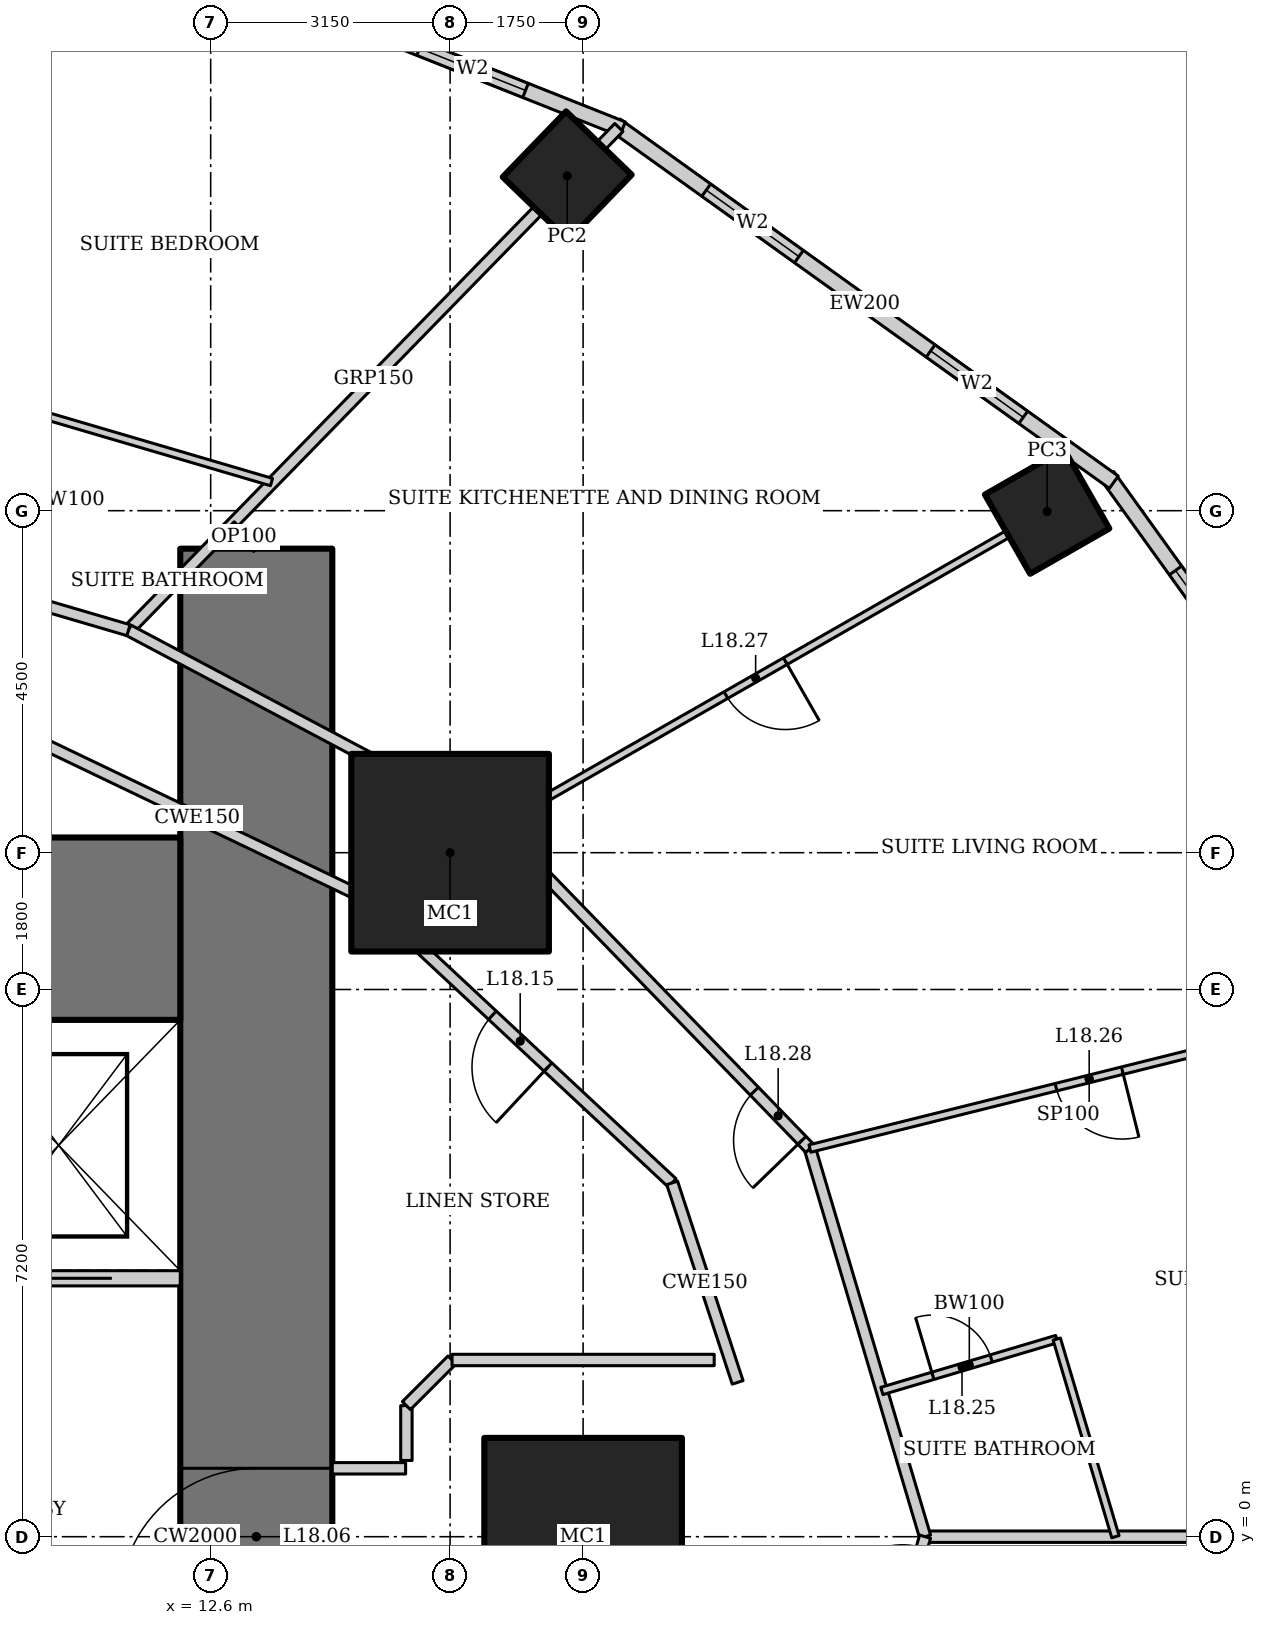
"""IFC4 building model, lengths in metres.
Left out: names, types, materials, properties, quantities, classifications, styles, units other than length and angle.
Written with IfcOpenShell. Run it as: python <this file> out.ifc"""

import sys

from ifc_helpers import new_model, si_unit, direction, frame, frame_2d, origin, origin_2d, place, context, subcontext, project, spatial, rectangle, hollow_rectangle, extrude, element, fill, save


model = new_model("IFC4")
c1 = context("Model", 3, precision=1e-05, world=origin(), true_north=direction((0.0, 1.0)))
c2 = subcontext(c1, "Body", "Model", "MODEL_VIEW")
j1 = project(units=[si_unit("LENGTHUNIT", "METRE"), si_unit("PLANEANGLEUNIT", "RADIAN")], contexts=[c1])
p1 = place(None, origin())
s1 = spatial("IfcSite", under=j1, at=p1, CompositionType="ELEMENT")
p2 = place(p1, origin())
s2 = spatial("IfcBuilding", under=s1, at=p2, CompositionType="ELEMENT")
p3 = place(p2, frame((0.0, 0.0, 80.2)))
s3 = spatial("IfcBuildingStorey", under=s2, at=p3, CompositionType="ELEMENT", Elevation=80.2)
for number, where, z_axis, x_axis in (
    (1, (17.5, 0.0, 0.0), (0.0, 0.0, 1.0), (1.0, 0.0, 0.0)),
    (2, (15.75, 9.0, 0.0), (0.0, 0.0, 1.0), (1.0, 0.0, 0.0)),
):
    element("IfcColumn", number, at=place(p3, frame(where, z_axis=z_axis, x_axis=x_axis)), inside=s3, PredefinedType="COLUMN", context=c2, shape_type="SweptSolid", body=[
        extrude(hollow_rectangle(XDim=2.6, YDim=2.6, WallThickness=0.13, at=origin_2d()), origin(), (0.0, 0.0, 1.0), 3.6),
    ])
p4 = place(p3, frame((23.605, 13.489, 0.0), z_axis=(0.0, 0.0, 1.0), x_axis=(0.86824298017, 0.496139221777, 0.0)))
e3 = element("IfcColumn", 3, at=p4, inside=s3, PredefinedType="COLUMN", context=c2, shape_type="SweptSolid", body=[
    extrude(hollow_rectangle(XDim=1.2, YDim=1.2, WallThickness=0.12, at=origin_2d()), origin(), (0.0, 0.0, 1.0), 3.6),
])
p5 = place(p3, frame((17.291, 17.905, 0.0), z_axis=(0.0, 0.0, 1.0), x_axis=(0.694658370459, 0.719339800339, 0.0)))
e4 = element("IfcColumn", 4, at=p5, inside=s3, PredefinedType="COLUMN", context=c2, shape_type="SweptSolid", body=[
    extrude(hollow_rectangle(XDim=1.2, YDim=1.2, WallThickness=0.1, at=origin_2d()), origin(), (0.0, 0.0, 1.0), 3.6),
])
p6 = place(p3, frame((13.2, -13.0, 0.0), z_axis=(0.0, 0.0, 1.0), x_axis=(0.0, 1.0, 0.0)))
e5 = element("IfcWall", 5, at=p6, inside=s3, PredefinedType="SHEAR", context=c2, shape_type="SweptSolid", body=[
    extrude(rectangle(XDim=26.0, YDim=2.0, at=frame_2d((13.0, 0.0))), origin(), (0.0, 0.0, 1.0), 3.6),
])
p7 = place(p6, frame((12.1, 0.0, 0.0)))
e6 = element("IfcOpeningElement", 6, at=p7, cuts=e5, PredefinedType="OPENING", context=c2, shape_type="SweptSolid", body=[
    extrude(rectangle(XDim=1.8, YDim=2.1, at=frame_2d((0.9, 1.05))), frame((0.0, 1.01, 0.0), z_axis=(0.0, -1.0, 0.0), x_axis=(1.0, 0.0, 0.0)), (0.0, 0.0, 1.0), 2.02),
])
p8 = place(p3, frame((12.2, 8.0, 0.0), z_axis=(0.0, 0.0, 1.0), x_axis=(-1.0, 0.0, 0.0)))
e7 = element("IfcWall", 7, at=p8, inside=s3, PredefinedType="SHEAR", context=c2, shape_type="SweptSolid", body=[
    extrude(rectangle(XDim=24.4, YDim=2.4, at=frame_2d((12.2, 0.0))), origin(), (0.0, 0.0, 1.0), 3.6),
])
p9 = place(p3, frame((12.2, 3.4, 0.0), z_axis=(0.0, 0.0, 1.0), x_axis=(-1.0, 0.0, 0.0)))
e8 = element("IfcWall", 8, at=p9, inside=s3, PredefinedType="SOLIDWALL", context=c2, shape_type="SweptSolid", body=[
    extrude(rectangle(XDim=6.6, YDim=0.2, at=frame_2d((3.3, 0.0))), origin(), (0.0, 0.0, 1.0), 3.6),
])
p10 = place(p9, frame((4.45, 0.0, 0.0)))
e9 = element("IfcOpeningElement", 9, at=p10, cuts=e8, PredefinedType="OPENING", context=c2, shape_type="SweptSolid", body=[
    extrude(rectangle(XDim=1.1, YDim=2.2, at=frame_2d((0.55, 1.1))), frame((0.0, 0.11, 0.0), z_axis=(0.0, -1.0, 0.0), x_axis=(1.0, 0.0, 0.0)), (0.0, 0.0, 1.0), 0.22),
])
p11 = place(p9, frame((0.9, 0.0, 0.0)))
e10 = element("IfcOpeningElement", 10, at=p11, cuts=e8, PredefinedType="OPENING", context=c2, shape_type="SweptSolid", body=[
    extrude(rectangle(XDim=1.4, YDim=2.2, at=frame_2d((0.7, 1.1))), frame((0.0, 0.11, 0.0), z_axis=(0.0, -1.0, 0.0), x_axis=(1.0, 0.0, 0.0)), (0.0, 0.0, 1.0), 0.22),
])
p12 = place(p3, frame((29.26, 7.2, 0.0), z_axis=(0.0, 0.0, 1.0), x_axis=(-0.583937613703, 0.811798536155, 0.0)))
e11 = element("IfcWall", 11, at=p12, inside=s3, PredefinedType="SOLIDWALL", context=c2, shape_type="SweptSolid", body=[
    extrude(rectangle(XDim=8.323, YDim=0.2, at=frame_2d((4.162, 0.0))), origin(), (0.0, 0.0, 1.0), 3.45),
])
p13 = place(p12, frame((1.531, 0.0, 0.5)))
e12 = element("IfcOpeningElement", 12, at=p13, cuts=e11, PredefinedType="OPENING", context=c2, shape_type="SweptSolid", body=[
    extrude(rectangle(XDim=1.5, YDim=2.2, at=frame_2d((0.75, 1.1))), frame((0.0, 0.11, 0.0), z_axis=(0.0, -1.0, 0.0), x_axis=(1.0, 0.0, 0.0)), (0.0, 0.0, 1.0), 0.22),
])
p14 = place(p12, frame((5.292, 0.0, 0.5)))
e13 = element("IfcOpeningElement", 13, at=p14, cuts=e11, PredefinedType="OPENING", context=c2, shape_type="SweptSolid", body=[
    extrude(rectangle(XDim=1.5, YDim=2.2, at=frame_2d((0.75, 1.1))), frame((0.0, 0.11, 0.0), z_axis=(0.0, -1.0, 0.0), x_axis=(1.0, 0.0, 0.0)), (0.0, 0.0, 1.0), 0.22),
])
p15 = place(p3, frame((24.482, 13.875, 0.0), z_axis=(0.0, 0.0, 1.0), x_axis=(-0.812791321576, 0.582554948112, 0.0)))
e14 = element("IfcWall", 14, at=p15, inside=s3, PredefinedType="SOLIDWALL", context=c2, shape_type="SweptSolid", body=[
    extrude(rectangle(XDim=8.063, YDim=0.2, at=frame_2d((4.032, 0.0))), origin(), (0.0, 0.0, 1.0), 3.45),
])
p16 = place(p15, frame((1.466, 0.0, 0.5)))
e15 = element("IfcOpeningElement", 15, at=p16, cuts=e14, PredefinedType="OPENING", context=c2, shape_type="SweptSolid", body=[
    extrude(rectangle(XDim=1.5, YDim=2.2, at=frame_2d((0.75, 1.1))), frame((0.0, 0.11, 0.0), z_axis=(0.0, -1.0, 0.0), x_axis=(1.0, 0.0, 0.0)), (0.0, 0.0, 1.0), 0.22),
])
p17 = place(p15, frame((5.097, 0.0, 0.5)))
e16 = element("IfcOpeningElement", 16, at=p17, cuts=e14, PredefinedType="OPENING", context=c2, shape_type="SweptSolid", body=[
    extrude(rectangle(XDim=1.5, YDim=2.2, at=frame_2d((0.75, 1.1))), frame((0.0, 0.11, 0.0), z_axis=(0.0, -1.0, 0.0), x_axis=(1.0, 0.0, 0.0)), (0.0, 0.0, 1.0), 0.22),
])
p18 = place(p3, frame((18.018, 18.523, 0.0), z_axis=(0.0, 0.0, 1.0), x_axis=(-0.929358351251, 0.369178892895, 0.0)))
e17 = element("IfcWall", 17, at=p18, inside=s3, PredefinedType="SOLIDWALL", context=c2, shape_type="SweptSolid", body=[
    extrude(rectangle(XDim=7.692, YDim=0.2, at=frame_2d((3.846, 0.0))), origin(), (0.0, 0.0, 1.0), 3.45),
])
p19 = place(p18, frame((1.373, 0.0, 0.5)))
e18 = element("IfcOpeningElement", 18, at=p19, cuts=e17, PredefinedType="OPENING", context=c2, shape_type="SweptSolid", body=[
    extrude(rectangle(XDim=1.5, YDim=2.2, at=frame_2d((0.75, 1.1))), frame((0.0, 0.11, 0.0), z_axis=(0.0, -1.0, 0.0), x_axis=(1.0, 0.0, 0.0)), (0.0, 0.0, 1.0), 0.22),
])
p20 = place(p18, frame((4.819, 0.0, 0.5)))
e19 = element("IfcOpeningElement", 19, at=p20, cuts=e17, PredefinedType="OPENING", context=c2, shape_type="SweptSolid", body=[
    extrude(rectangle(XDim=1.5, YDim=2.2, at=frame_2d((0.75, 1.1))), frame((0.0, 0.11, 0.0), z_axis=(0.0, -1.0, 0.0), x_axis=(1.0, 0.0, 0.0)), (0.0, 0.0, 1.0), 0.22),
])
p21 = place(p3, frame((30.821, 0.0, 0.0), z_axis=(0.0, 0.0, 1.0), x_axis=(-1.0, 0.0, 0.0)))
e20 = element("IfcWall", 20, at=p21, inside=s3, PredefinedType="PARTITIONING", context=c2, shape_type="SweptSolid", body=[
    extrude(rectangle(XDim=8.821, YDim=0.15, at=frame_2d((4.41, 0.0))), origin(), (0.0, 0.0, 1.0), 2.528),
])
p22 = place(p3, frame((17.97, 18.542, 0.0), z_axis=(0.0, 0.0, 1.0), x_axis=(-0.698279935955, -0.715824790743, 0.0)))
e21 = element("IfcWall", 21, at=p22, inside=s3, PredefinedType="PARTITIONING", context=c2, shape_type="SweptSolid", body=[
    extrude(rectangle(XDim=9.24, YDim=0.15, at=frame_2d((4.62, 0.0))), origin(), (0.0, 0.0, 1.0), 2.528),
])
p23 = place(p3, frame((22.0, 0.0, 0.0), z_axis=(0.0, 0.0, 1.0), x_axis=(-0.284584469409, 0.95865096869, 0.0)))
e22 = element("IfcWall", 22, at=p23, inside=s3, PredefinedType="PARTITIONING", context=c2, shape_type="SweptSolid", body=[
    extrude(rectangle(XDim=5.327, YDim=0.15, at=frame_2d((2.664, 0.0))), origin(), (0.0, 0.0, 1.0), 3.45),
])
p24 = place(p3, frame((20.484, 5.107, 0.0), z_axis=(0.0, 0.0, 1.0), x_axis=(-0.695871090686, 0.71816671125, 0.0)))
e23 = element("IfcWall", 23, at=p24, inside=s3, PredefinedType="PARTITIONING", context=c2, shape_type="SweptSolid", body=[
    extrude(rectangle(XDim=5.913, YDim=0.15, at=frame_2d((2.957, 0.0))), origin(), (0.0, 0.0, 1.0), 3.45),
])
p25 = place(p24, frame((0.15, 0.0, 0.0)))
e24 = element("IfcOpeningElement", 24, at=p25, cuts=e23, PredefinedType="OPENING", context=c2, shape_type="SweptSolid", body=[
    extrude(rectangle(XDim=0.9, YDim=2.1, at=frame_2d((0.45, 1.05))), frame((0.0, 0.085, 0.0), z_axis=(0.0, -1.0, 0.0), x_axis=(1.0, 0.0, 0.0)), (0.0, 0.0, 1.0), 0.17),
])
p26 = place(p3, frame((16.369, 9.354, 0.0), z_axis=(0.0, 0.0, 1.0), x_axis=(-0.883334368785, 0.468743419071, 0.0)))
e25 = element("IfcWall", 25, at=p26, inside=s3, PredefinedType="PARTITIONING", context=c2, shape_type="SweptSolid", body=[
    extrude(rectangle(XDim=5.491, YDim=0.15, at=frame_2d((2.746, 0.0))), origin(), (0.0, 0.0, 1.0), 3.45),
])
p27 = place(p3, frame((11.519, 11.928, 0.0), z_axis=(0.0, 0.0, 1.0), x_axis=(-0.959496227294, 0.281721475589, 0.0)))
e26 = element("IfcWall", 26, at=p27, inside=s3, PredefinedType="PARTITIONING", context=c2, shape_type="SweptSolid", body=[
    extrude(rectangle(XDim=4.933, YDim=0.15, at=frame_2d((2.466, 0.0))), origin(), (0.0, 0.0, 1.0), 3.45),
])
p28 = place(p3, frame((20.484, -5.107, 0.0), z_axis=(0.0, 0.0, 1.0), x_axis=(0.284584469409, 0.95865096869, 0.0)))
e27 = element("IfcWall", 27, at=p28, inside=s3, PredefinedType="PARTITIONING", context=c2, shape_type="SweptSolid", body=[
    extrude(rectangle(XDim=5.327, YDim=0.15, at=frame_2d((2.664, 0.0))), origin(), (0.0, 0.0, 1.0), 3.45),
])
p29 = place(p28, frame((4.278, 0.0, 0.0)))
e28 = element("IfcOpeningElement", 28, at=p29, cuts=e27, PredefinedType="OPENING", context=c2, shape_type="SweptSolid", body=[
    extrude(rectangle(XDim=0.9, YDim=2.1, at=frame_2d((0.45, 1.05))), frame((0.0, 0.085, 0.0), z_axis=(0.0, -1.0, 0.0), x_axis=(1.0, 0.0, 0.0)), (0.0, 0.0, 1.0), 0.17),
])
p30 = place(p3, frame((18.672, 4.655, 0.0), z_axis=(0.0, 0.0, 1.0), x_axis=(-0.731260145007, 0.682098673452, 0.0)))
e29 = element("IfcWall", 29, at=p30, inside=s3, PredefinedType="PARTITIONING", context=c2, shape_type="SweptSolid", body=[
    extrude(rectangle(XDim=5.468, YDim=0.15, at=frame_2d((2.734, 0.0))), origin(), (0.0, 0.0, 1.0), 3.45),
])
p31 = place(p30, frame((2.234, 0.0, 0.0)))
e30 = element("IfcOpeningElement", 30, at=p31, cuts=e29, PredefinedType="OPENING", context=c2, shape_type="SweptSolid", body=[
    extrude(rectangle(XDim=1.0, YDim=2.1, at=frame_2d((0.5, 1.05))), frame((0.0, 0.085, 0.0), z_axis=(0.0, -1.0, 0.0), x_axis=(1.0, 0.0, 0.0)), (0.0, 0.0, 1.0), 0.17),
])
p32 = place(p3, frame((14.673, 8.385, 0.0), z_axis=(0.0, 0.0, 1.0), x_axis=(-0.901869692799, 0.43200816799, 0.0)))
e31 = element("IfcWall", 31, at=p32, inside=s3, PredefinedType="PARTITIONING", context=c2, shape_type="SweptSolid", body=[
    extrude(rectangle(XDim=4.986, YDim=0.15, at=frame_2d((2.493, 0.0))), origin(), (0.0, 0.0, 1.0), 3.45),
])
p33 = place(p3, frame((21.431, 1.917, 0.0), z_axis=(0.0, 0.0, 1.0), x_axis=(0.958639927723, 0.284621659356, 0.0)))
e32 = element("IfcWall", 32, at=p33, inside=s3, PredefinedType="PARTITIONING", context=c2, shape_type="SweptSolid", body=[
    extrude(rectangle(XDim=2.4, YDim=0.1, at=frame_2d((1.2, 0.0))), origin(), (0.0, 0.0, 1.0), 3.45),
])
p34 = place(p33, frame((0.7, 0.0, 0.0)))
e33 = element("IfcOpeningElement", 33, at=p34, cuts=e32, PredefinedType="OPENING", context=c2, shape_type="SweptSolid", body=[
    extrude(rectangle(XDim=0.8, YDim=2.1, at=frame_2d((0.4, 1.05))), frame((0.0, 0.06, 0.0), z_axis=(0.0, -1.0, 0.0), x_axis=(1.0, 0.0, 0.0)), (0.0, 0.0, 1.0), 0.12),
])
p35 = place(p3, frame((23.732, 2.6, 0.0), z_axis=(0.0, 0.0, 1.0), x_axis=(0.284514277473, -0.958671803025, 0.0)))
e34 = element("IfcWall", 34, at=p35, inside=s3, PredefinedType="PARTITIONING", context=c2, shape_type="SweptSolid", body=[
    extrude(rectangle(XDim=2.712, YDim=0.1, at=frame_2d((1.356, 0.0))), origin(), (0.0, 0.0, 1.0), 3.45),
])
p36 = place(p3, frame((27.833, 6.939, 0.0), z_axis=(0.0, 0.0, 1.0), x_axis=(-0.970295894358, -0.24192122146, 0.0)))
e35 = element("IfcWall", 35, at=p36, inside=s3, PredefinedType="PARTITIONING", context=c2, shape_type="SweptSolid", body=[
    extrude(rectangle(XDim=7.574, YDim=0.1, at=frame_2d((3.787, 0.0))), origin(), (0.0, 0.0, 1.0), 2.333),
])
p37 = place(p36, frame((3.337, 0.0, 0.0)))
e36 = element("IfcOpeningElement", 36, at=p37, cuts=e35, PredefinedType="OPENING", context=c2, shape_type="SweptSolid", body=[
    extrude(rectangle(XDim=0.9, YDim=2.1, at=frame_2d((0.45, 1.05))), frame((0.0, 0.06, 0.0), z_axis=(0.0, -1.0, 0.0), x_axis=(1.0, 0.0, 0.0)), (0.0, 0.0, 1.0), 0.12),
])
p38 = place(p3, frame((23.171, 13.24, 0.0), z_axis=(0.0, 0.0, 1.0), x_axis=(-0.868243142124, -0.496138938357, 0.0)))
e37 = element("IfcWall", 37, at=p38, inside=s3, PredefinedType="PARTITIONING", context=c2, shape_type="SweptSolid", body=[
    extrude(rectangle(XDim=7.834, YDim=0.1, at=frame_2d((3.917, 0.0))), origin(), (0.0, 0.0, 1.0), 2.693),
])
p39 = place(p38, frame((3.467, 0.0, 0.0)))
e38 = element("IfcOpeningElement", 38, at=p39, cuts=e37, PredefinedType="OPENING", context=c2, shape_type="SweptSolid", body=[
    extrude(rectangle(XDim=0.9, YDim=2.1, at=frame_2d((0.45, 1.05))), frame((0.0, 0.06, 0.0), z_axis=(0.0, -1.0, 0.0), x_axis=(1.0, 0.0, 0.0)), (0.0, 0.0, 1.0), 0.12),
])
p40 = place(p3, frame((10.276, 14.794, 0.0), z_axis=(0.0, 0.0, 1.0), x_axis=(0.959495516486, -0.281723896473, 0.0)))
e39 = element("IfcWall", 39, at=p40, inside=s3, PredefinedType="PARTITIONING", context=c2, shape_type="SweptSolid", body=[
    extrude(rectangle(XDim=3.257, YDim=0.1, at=frame_2d((1.628, 0.0))), origin(), (0.0, 0.0, 1.0), 3.45),
])
p41 = place(p3, frame((13.2, 13.0, 0.0), z_axis=(0.0, 0.0, 1.0), x_axis=(-0.715906247499, 0.698196422786, 0.0)))
e40 = element("IfcWall", 40, at=p41, inside=s3, PredefinedType="PARTITIONING", context=c2, shape_type="SweptSolid", body=[
    extrude(rectangle(XDim=0.455, YDim=0.1, at=frame_2d((0.228, 0.0))), origin(), (0.0, 0.0, 1.0), 3.45),
])
p42 = place(p3, frame((19.533, 2.03, 0.0), z_axis=(0.0, 0.0, 1.0), x_axis=(-0.311929965981, 0.950105097515, 0.0)))
e41 = element("IfcWall", 41, at=p42, inside=s3, PredefinedType="PARTITIONING", context=c2, shape_type="SweptSolid", body=[
    extrude(rectangle(XDim=2.763, YDim=0.15, at=frame_2d((1.381, 0.0))), origin(), (0.0, 0.0, 1.0), 3.45),
])
p43 = place(p3, frame((14.2, 0.9, 0.0), z_axis=(0.0, 0.0, 1.0), x_axis=(1.0, 0.0, 0.0)))
e42 = element("IfcWall", 42, at=p43, inside=s3, PredefinedType="PARTITIONING", context=c2, shape_type="SweptSolid", body=[
    extrude(rectangle(XDim=0.965, YDim=0.15, at=frame_2d((0.482, 0.0))), origin(), (0.0, 0.0, 1.0), 3.45),
])
p44 = place(p3, frame((15.175, 1.003, 0.0), z_axis=(0.0, 0.0, 1.0), x_axis=(0.0, 1.0, 0.0)))
e43 = element("IfcWall", 43, at=p44, inside=s3, PredefinedType="PARTITIONING", context=c2, shape_type="SweptSolid", body=[
    extrude(rectangle(XDim=0.721, YDim=0.15, at=frame_2d((0.361, 0.0))), origin(), (0.0, 0.0, 1.0), 3.45),
])
p45 = place(p3, frame((15.175, 1.725, 0.0), z_axis=(0.0, 0.0, 1.0), x_axis=(0.707106781187, 0.707106781187, 0.0)))
e44 = element("IfcWall", 44, at=p45, inside=s3, PredefinedType="PARTITIONING", context=c2, shape_type="SweptSolid", body=[
    extrude(rectangle(XDim=0.849, YDim=0.15, at=frame_2d((0.425, 0.0))), origin(), (0.0, 0.0, 1.0), 3.45),
])
p46 = place(p3, frame((15.775, 2.325, 0.0), z_axis=(0.0, 0.0, 1.0), x_axis=(1.0, 0.0, 0.0)))
e45 = element("IfcWall", 45, at=p46, inside=s3, PredefinedType="PARTITIONING", context=c2, shape_type="SweptSolid", body=[
    extrude(rectangle(XDim=3.449, YDim=0.15, at=frame_2d((1.725, 0.0))), origin(), (0.0, 0.0, 1.0), 3.45),
])
p47 = place(p14, origin())
e46 = element("IfcWindow", 46, at=p47, inside=s3, PartitioningType="SINGLE_PANEL", PredefinedType="WINDOW", context=c2, shape_type="SweptSolid", body=[
    extrude(rectangle(XDim=1.5, YDim=2.2, at=frame_2d((0.75, 1.1))), frame((0.0, 0.03, 0.0), z_axis=(0.0, -1.0, 0.0), x_axis=(1.0, 0.0, 0.0)), (0.0, 0.0, 1.0), 0.06),
])
fill(e13, e46)
p48 = place(p16, origin())
e47 = element("IfcWindow", 47, at=p48, inside=s3, PartitioningType="SINGLE_PANEL", PredefinedType="WINDOW", context=c2, shape_type="SweptSolid", body=[
    extrude(rectangle(XDim=1.5, YDim=2.2, at=frame_2d((0.75, 1.1))), frame((0.0, 0.03, 0.0), z_axis=(0.0, -1.0, 0.0), x_axis=(1.0, 0.0, 0.0)), (0.0, 0.0, 1.0), 0.06),
])
fill(e15, e47)
p49 = place(p17, origin())
e48 = element("IfcWindow", 48, at=p49, inside=s3, PartitioningType="SINGLE_PANEL", PredefinedType="WINDOW", context=c2, shape_type="SweptSolid", body=[
    extrude(rectangle(XDim=1.5, YDim=2.2, at=frame_2d((0.75, 1.1))), frame((0.0, 0.03, 0.0), z_axis=(0.0, -1.0, 0.0), x_axis=(1.0, 0.0, 0.0)), (0.0, 0.0, 1.0), 0.06),
])
fill(e16, e48)
p50 = place(p19, origin())
e49 = element("IfcWindow", 49, at=p50, inside=s3, PartitioningType="SINGLE_PANEL", PredefinedType="WINDOW", context=c2, shape_type="SweptSolid", body=[
    extrude(rectangle(XDim=1.5, YDim=2.2, at=frame_2d((0.75, 1.1))), frame((0.0, 0.03, 0.0), z_axis=(0.0, -1.0, 0.0), x_axis=(1.0, 0.0, 0.0)), (0.0, 0.0, 1.0), 0.06),
])
fill(e18, e49)
p51 = place(p7, origin())
e50 = element("IfcDoor", 50, at=p51, inside=s3, OperationType="DOUBLE_DOOR_DOUBLE_SWING", PredefinedType="DOOR", context=c2, shape_type="SweptSolid", body=[
    extrude(rectangle(XDim=1.8, YDim=2.1, at=frame_2d((0.9, 1.05))), frame((0.0, 0.025, 0.0), z_axis=(0.0, -1.0, 0.0), x_axis=(1.0, 0.0, 0.0)), (0.0, 0.0, 1.0), 0.05),
])
fill(e6, e50)
p52 = place(p11, origin())
e51 = element("IfcDoor", 51, at=p52, inside=s3, OperationType="DOUBLE_DOOR_SLIDING", PredefinedType="DOOR", context=c2, shape_type="SweptSolid", body=[
    extrude(rectangle(XDim=1.4, YDim=2.2, at=frame_2d((0.7, 1.1))), frame((0.0, 0.025, 0.0), z_axis=(0.0, -1.0, 0.0), x_axis=(1.0, 0.0, 0.0)), (0.0, 0.0, 1.0), 0.05),
])
fill(e10, e51)
p53 = place(p31, origin())
e52 = element("IfcDoor", 52, at=p53, inside=s3, OperationType="SINGLE_SWING_LEFT", PredefinedType="DOOR", context=c2, shape_type="SweptSolid", body=[
    extrude(rectangle(XDim=1.0, YDim=2.1, at=frame_2d((0.5, 1.05))), frame((0.0, 0.025, 0.0), z_axis=(0.0, -1.0, 0.0), x_axis=(1.0, 0.0, 0.0)), (0.0, 0.0, 1.0), 0.05),
])
fill(e30, e52)
p54 = place(p34, origin())
e53 = element("IfcDoor", 53, at=p54, inside=s3, OperationType="SINGLE_SWING_LEFT", PredefinedType="DOOR", context=c2, shape_type="SweptSolid", body=[
    extrude(rectangle(XDim=0.8, YDim=2.1, at=frame_2d((0.4, 1.05))), frame((0.0, 0.025, 0.0), z_axis=(0.0, -1.0, 0.0), x_axis=(1.0, 0.0, 0.0)), (0.0, 0.0, 1.0), 0.05),
])
fill(e33, e53)
p55 = place(p37, origin())
e54 = element("IfcDoor", 54, at=p55, inside=s3, OperationType="SINGLE_SWING_LEFT", PredefinedType="DOOR", context=c2, shape_type="SweptSolid", body=[
    extrude(rectangle(XDim=0.9, YDim=2.1, at=frame_2d((0.45, 1.05))), frame((0.0, 0.025, 0.0), z_axis=(0.0, -1.0, 0.0), x_axis=(1.0, 0.0, 0.0)), (0.0, 0.0, 1.0), 0.05),
])
fill(e36, e54)
p56 = place(p39, origin())
e55 = element("IfcDoor", 55, at=p56, inside=s3, OperationType="SINGLE_SWING_LEFT", PredefinedType="DOOR", context=c2, shape_type="SweptSolid", body=[
    extrude(rectangle(XDim=0.9, YDim=2.1, at=frame_2d((0.45, 1.05))), frame((0.0, 0.025, 0.0), z_axis=(0.0, -1.0, 0.0), x_axis=(1.0, 0.0, 0.0)), (0.0, 0.0, 1.0), 0.05),
])
fill(e38, e55)
p57 = place(p25, origin())
e56 = element("IfcDoor", 56, at=p57, inside=s3, OperationType="SINGLE_SWING_LEFT", PredefinedType="DOOR", context=c2, shape_type="SweptSolid", body=[
    extrude(rectangle(XDim=0.9, YDim=2.1, at=frame_2d((0.45, 1.05))), frame((0.0, 0.025, 0.0), z_axis=(0.0, -1.0, 0.0), x_axis=(1.0, 0.0, 0.0)), (0.0, 0.0, 1.0), 0.05),
])
fill(e24, e56)
save(model, sys.argv[1])
